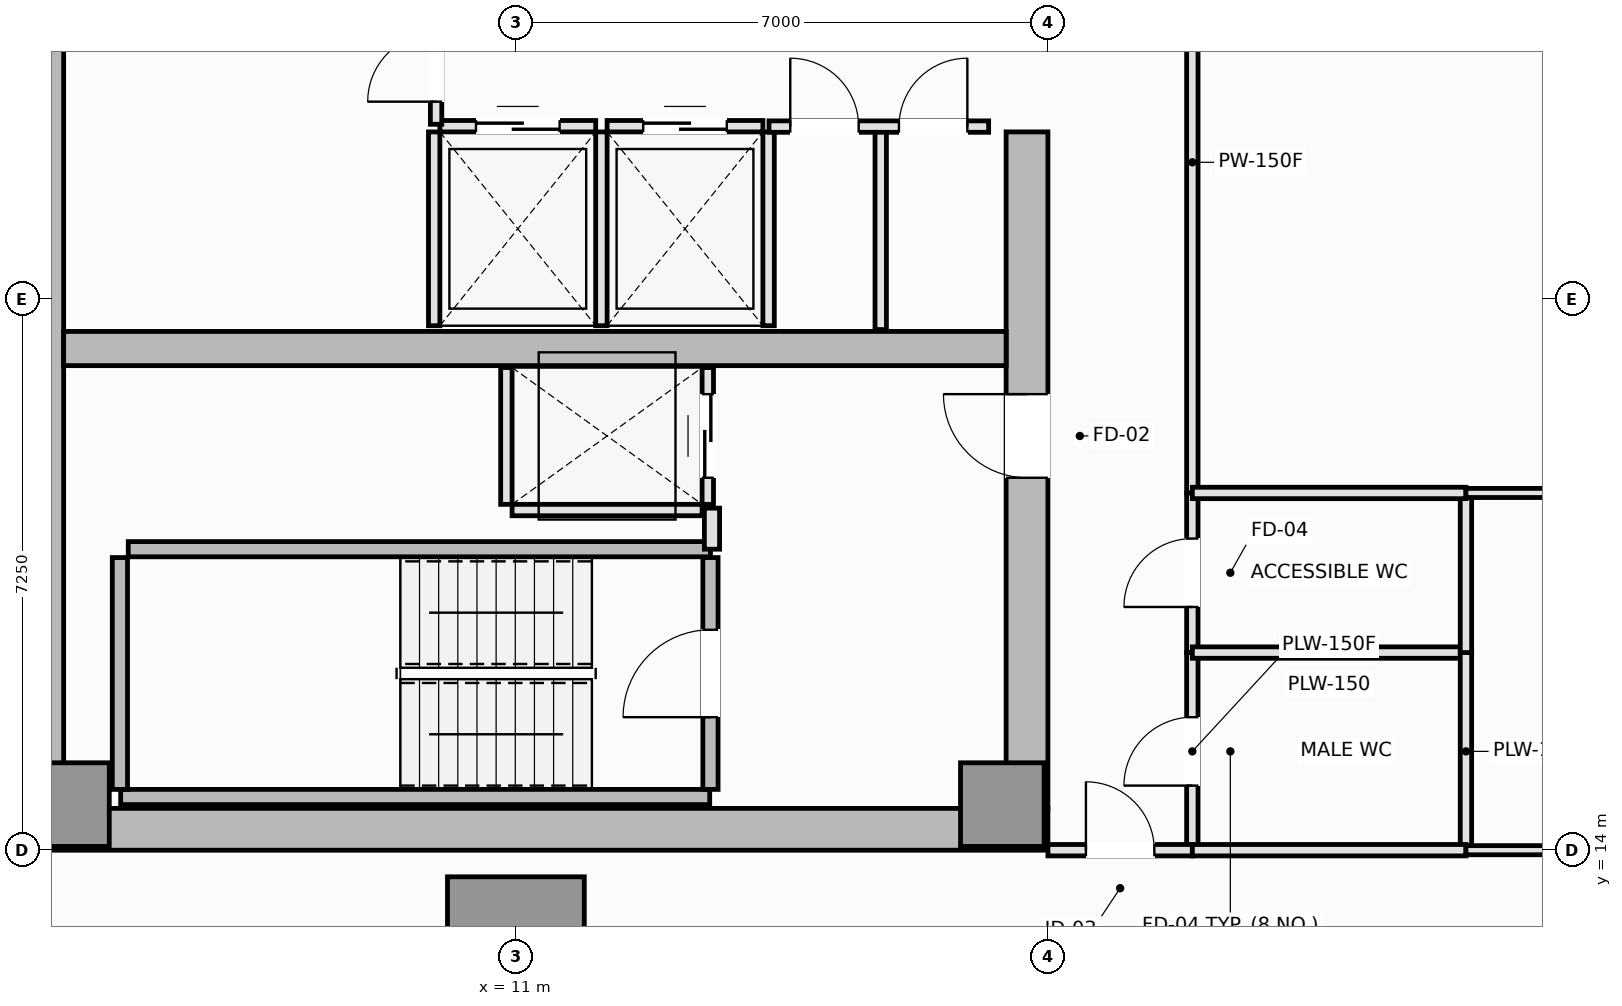
"""IFC4 building model, lengths in metres.
Left out: names, types, materials, properties, quantities, classifications, styles, units other than length and angle.
Written with IfcOpenShell. Run it as: python <this file> out.ifc"""

import sys

from ifc_helpers import new_model, si_unit, direction, frame, frame_2d, origin, origin_2d, place, context, subcontext, project, spatial, rectangle, extrude, element, fill, save


model = new_model("IFC4")
c1 = context("Model", 3, precision=1e-05, world=origin(), true_north=direction((0.0, 1.0)))
c2 = subcontext(c1, "Body", "Model", "MODEL_VIEW")
j1 = project(units=[si_unit("LENGTHUNIT", "METRE"), si_unit("PLANEANGLEUNIT", "RADIAN")], contexts=[c1])
p1 = place(None, origin())
s1 = spatial("IfcSite", under=j1, at=p1, CompositionType="ELEMENT")
p2 = place(p1, origin())
s2 = spatial("IfcBuilding", under=s1, at=p2, CompositionType="ELEMENT")
p3 = place(p2, frame((0.0, 0.0, 202.25)))
s3 = spatial("IfcBuildingStorey", under=s2, at=p3, CompositionType="ELEMENT", Elevation=202.25)
p4 = place(p3, frame((4.5, 14.275, 0.0), z_axis=(0.0, 0.0, 1.0), x_axis=(1.0, 0.0, 0.0)))
e1 = element("IfcWall", 1, at=p4, inside=s3, PredefinedType="SHEAR", context=c2, shape_type="SweptSolid", body=[
    extrude(rectangle(XDim=13.5, YDim=0.55, at=frame_2d((6.75, 0.0))), origin(), (0.0, 0.0, 1.0), 3.55),
])
p5 = place(p3, frame((4.775, 14.55, 0.0), z_axis=(0.0, 0.0, 1.0), x_axis=(0.0, 1.0, 0.0)))
e2 = element("IfcWall", 2, at=p5, inside=s3, PredefinedType="SHEAR", context=c2, shape_type="SweptSolid", body=[
    extrude(rectangle(XDim=21.4, YDim=0.55, at=frame_2d((10.7, 0.0))), origin(), (0.0, 0.0, 1.0), 3.55),
])
p6 = place(p3, frame((17.725, 14.55, 0.0), z_axis=(0.0, 0.0, 1.0), x_axis=(0.0, 1.0, 0.0)))
e3 = element("IfcWall", 3, at=p6, inside=s3, PredefinedType="SHEAR", context=c2, shape_type="SweptSolid", body=[
    extrude(rectangle(XDim=8.9, YDim=0.55, at=frame_2d((4.45, 0.0))), origin(), (0.0, 0.0, 1.0), 3.55),
])
p7 = place(p6, frame((4.35, 0.0, 0.0)))
e4 = element("IfcOpeningElement", 4, at=p7, cuts=e3, PredefinedType="OPENING", context=c2, shape_type="SweptSolid", body=[
    extrude(rectangle(XDim=1.1, YDim=2.15, at=frame_2d((0.55, 1.075))), frame((0.0, 0.285, 0.0), z_axis=(0.0, -1.0, 0.0), x_axis=(1.0, 0.0, 0.0)), (0.0, 0.0, 1.0), 0.57),
])
p8 = place(p3, frame((5.05, 20.6, 0.0), z_axis=(0.0, 0.0, 1.0), x_axis=(1.0, 0.0, 0.0)))
e5 = element("IfcWall", 5, at=p8, inside=s3, PredefinedType="SHEAR", context=c2, shape_type="SweptSolid", body=[
    extrude(rectangle(XDim=12.4, YDim=0.45, at=frame_2d((6.2, 0.0))), origin(), (0.0, 0.0, 1.0), 3.55),
])
for number, where, z_axis, x_axis in (
    (6, (5.1, 14.6, 0.0), (0.0, 0.0, 1.0), (1.0, 0.0, 0.0)),
    (7, (17.4, 14.6, 0.0), (0.0, 0.0, 1.0), (1.0, 0.0, 0.0)),
):
    element("IfcColumn", number, at=place(p3, frame(where, z_axis=z_axis, x_axis=x_axis)), inside=s3, PredefinedType="PILASTER", context=c2, shape_type="SweptSolid", body=[
        extrude(rectangle(XDim=1.1, YDim=1.1, at=origin_2d()), origin(), (0.0, 0.0, 1.0), 3.55),
    ])
p9 = place(p3, frame((11.0, 12.75, 0.0), z_axis=(0.0, 0.0, 1.0), x_axis=(1.0, 0.0, 0.0)))
e8 = element("IfcColumn", 8, at=p9, inside=s3, PredefinedType="COLUMN", context=c2, shape_type="SweptSolid", body=[
    extrude(rectangle(XDim=1.8, YDim=1.8, at=origin_2d()), origin(), (0.0, 0.0, 1.0), 3.55),
])
p10 = place(p3, frame((5.8, 14.7, 0.0), z_axis=(0.0, 0.0, 1.0), x_axis=(1.0, 0.0, 0.0)))
e9 = element("IfcWall", 9, at=p10, inside=s3, PredefinedType="SOLIDWALL", context=c2, shape_type="SweptSolid", body=[
    extrude(rectangle(XDim=7.75, YDim=0.2, at=frame_2d((3.875, 0.0))), origin(), (0.0, 0.0, 1.0), 3.55),
])
p11 = place(p3, frame((5.79, 14.8, 0.0), z_axis=(0.0, 0.0, 1.0), x_axis=(0.0, 1.0, 0.0)))
e10 = element("IfcWall", 10, at=p11, inside=s3, PredefinedType="SOLIDWALL", context=c2, shape_type="SweptSolid", body=[
    extrude(rectangle(XDim=3.05, YDim=0.2, at=frame_2d((1.525, 0.0))), origin(), (0.0, 0.0, 1.0), 3.55),
])
p12 = place(p3, frame((5.9, 17.96, 0.0), z_axis=(0.0, 0.0, 1.0), x_axis=(1.0, 0.0, 0.0)))
e11 = element("IfcWall", 11, at=p12, inside=s3, PredefinedType="SOLIDWALL", context=c2, shape_type="SweptSolid", body=[
    extrude(rectangle(XDim=7.66, YDim=0.2, at=frame_2d((3.83, 0.0))), origin(), (0.0, 0.0, 1.0), 3.55),
])
p13 = place(p3, frame((13.56, 14.8, 0.0), z_axis=(0.0, 0.0, 1.0), x_axis=(0.0, 1.0, 0.0)))
e12 = element("IfcWall", 12, at=p13, inside=s3, PredefinedType="SOLIDWALL", context=c2, shape_type="SweptSolid", body=[
    extrude(rectangle(XDim=3.05, YDim=0.2, at=frame_2d((1.525, 0.0))), origin(), (0.0, 0.0, 1.0), 3.55),
])
p14 = place(p13, frame((0.95, 0.0, 0.0)))
e13 = element("IfcOpeningElement", 13, at=p14, cuts=e12, PredefinedType="OPENING", context=c2, shape_type="SweptSolid", body=[
    extrude(rectangle(XDim=1.15, YDim=2.15, at=frame_2d((0.575, 1.075))), frame((0.0, 0.11, 0.0), z_axis=(0.0, -1.0, 0.0), x_axis=(1.0, 0.0, 0.0)), (0.0, 0.0, 1.0), 0.22),
])
p15 = place(p3, frame((10.0, 23.525, 0.0), z_axis=(0.0, 0.0, 1.0), x_axis=(1.0, 0.0, 0.0)))
e14 = element("IfcWall", 14, at=p15, inside=s3, PredefinedType="PARTITIONING", context=c2, shape_type="SweptSolid", body=[
    extrude(rectangle(XDim=2.05, YDim=0.15, at=frame_2d((1.025, 0.0))), origin(), (0.0, 0.0, 1.0), 3.37),
])
p16 = place(p15, frame((0.475, 0.0, 0.0)))
e15 = element("IfcOpeningElement", 15, at=p16, cuts=e14, PredefinedType="OPENING", context=c2, shape_type="SweptSolid", body=[
    extrude(rectangle(XDim=1.1, YDim=2.2, at=frame_2d((0.55, 1.1))), frame((0.0, 0.085, 0.0), z_axis=(0.0, -1.0, 0.0), x_axis=(1.0, 0.0, 0.0)), (0.0, 0.0, 1.0), 0.17),
])
for number, where, z_axis, x_axis in (
    (16, (9.925, 20.9, 0.0), (0.0, 0.0, 1.0), (0.0, 1.0, 0.0)),
    (17, (12.125, 20.9, 0.0), (0.0, 0.0, 1.0), (0.0, 1.0, 0.0)),
):
    element("IfcWall", number, at=place(p3, frame(where, z_axis=z_axis, x_axis=x_axis)), inside=s3, PredefinedType="PARTITIONING", context=c2, shape_type="SweptSolid", body=[
        extrude(rectangle(XDim=2.55, YDim=0.15, at=frame_2d((1.275, 0.0))), origin(), (0.0, 0.0, 1.0), 3.37),
    ])
p17 = place(p3, frame((12.2, 23.525, 0.0), z_axis=(0.0, 0.0, 1.0), x_axis=(1.0, 0.0, 0.0)))
e18 = element("IfcWall", 18, at=p17, inside=s3, PredefinedType="PARTITIONING", context=c2, shape_type="SweptSolid", body=[
    extrude(rectangle(XDim=2.05, YDim=0.15, at=frame_2d((1.025, 0.0))), origin(), (0.0, 0.0, 1.0), 3.37),
])
p18 = place(p17, frame((0.475, 0.0, 0.0)))
e19 = element("IfcOpeningElement", 19, at=p18, cuts=e18, PredefinedType="OPENING", context=c2, shape_type="SweptSolid", body=[
    extrude(rectangle(XDim=1.1, YDim=2.2, at=frame_2d((0.55, 1.1))), frame((0.0, 0.085, 0.0), z_axis=(0.0, -1.0, 0.0), x_axis=(1.0, 0.0, 0.0)), (0.0, 0.0, 1.0), 0.17),
])
p19 = place(p3, frame((14.325, 20.9, 0.0), z_axis=(0.0, 0.0, 1.0), x_axis=(0.0, 1.0, 0.0)))
e20 = element("IfcWall", 20, at=p19, inside=s3, PredefinedType="PARTITIONING", context=c2, shape_type="SweptSolid", body=[
    extrude(rectangle(XDim=2.55, YDim=0.15, at=frame_2d((1.275, 0.0))), origin(), (0.0, 0.0, 1.0), 3.37),
])
p20 = place(p3, frame((10.95, 18.475, 0.0), z_axis=(0.0, 0.0, 1.0), x_axis=(1.0, 0.0, 0.0)))
e21 = element("IfcWall", 21, at=p20, inside=s3, PredefinedType="PARTITIONING", context=c2, shape_type="SweptSolid", body=[
    extrude(rectangle(XDim=2.5, YDim=0.15, at=frame_2d((1.25, 0.0))), origin(), (0.0, 0.0, 1.0), 3.37),
])
p21 = place(p3, frame((10.875, 18.55, 0.0), z_axis=(0.0, 0.0, 1.0), x_axis=(0.0, 1.0, 0.0)))
e22 = element("IfcWall", 22, at=p21, inside=s3, PredefinedType="PARTITIONING", context=c2, shape_type="SweptSolid", body=[
    extrude(rectangle(XDim=1.8, YDim=0.15, at=frame_2d((0.9, 0.0))), origin(), (0.0, 0.0, 1.0), 3.37),
])
p22 = place(p3, frame((13.525, 18.55, 0.0), z_axis=(0.0, 0.0, 1.0), x_axis=(0.0, 1.0, 0.0)))
e23 = element("IfcWall", 23, at=p22, inside=s3, PredefinedType="PARTITIONING", context=c2, shape_type="SweptSolid", body=[
    extrude(rectangle(XDim=1.8, YDim=0.15, at=frame_2d((0.9, 0.0))), origin(), (0.0, 0.0, 1.0), 3.37),
])
p23 = place(p22, frame((0.35, 0.0, 0.0)))
e24 = element("IfcOpeningElement", 24, at=p23, cuts=e23, PredefinedType="OPENING", context=c2, shape_type="SweptSolid", body=[
    extrude(rectangle(XDim=1.1, YDim=2.2, at=frame_2d((0.55, 1.1))), frame((0.0, 0.085, 0.0), z_axis=(0.0, -1.0, 0.0), x_axis=(1.0, 0.0, 0.0)), (0.0, 0.0, 1.0), 0.17),
])
p24 = place(p3, frame((13.58, 17.96, 0.0), z_axis=(0.0, 0.0, 1.0), x_axis=(0.0, 1.0, 0.0)))
e25 = element("IfcWall", 25, at=p24, inside=s3, PredefinedType="PARTITIONING", context=c2, shape_type="SweptSolid", body=[
    extrude(rectangle(XDim=0.54, YDim=0.2, at=frame_2d((0.27, 0.0))), origin(), (0.0, 0.0, 1.0), 3.37),
])
p25 = place(p3, frame((9.95, 23.55, 0.0), z_axis=(0.0, 0.0, 1.0), x_axis=(0.0, 1.0, 0.0)))
e26 = element("IfcWall", 26, at=p25, inside=s3, PredefinedType="PARTITIONING", context=c2, shape_type="SweptSolid", body=[
    extrude(rectangle(XDim=3.4, YDim=0.15, at=frame_2d((1.7, 0.0))), origin(), (0.0, 0.0, 1.0), 3.37),
])
p26 = place(p25, frame((0.298, 0.0, 0.0)))
e27 = element("IfcOpeningElement", 27, at=p26, cuts=e26, PredefinedType="OPENING", context=c2, shape_type="SweptSolid", body=[
    extrude(rectangle(XDim=0.9, YDim=2.1, at=frame_2d((0.45, 1.05))), frame((0.0, 0.085, 0.0), z_axis=(0.0, -1.0, 0.0), x_axis=(1.0, 0.0, 0.0)), (0.0, 0.0, 1.0), 0.17),
])
p27 = place(p25, frame((2.202, 0.0, 0.0)))
e28 = element("IfcOpeningElement", 28, at=p27, cuts=e26, PredefinedType="OPENING", context=c2, shape_type="SweptSolid", body=[
    extrude(rectangle(XDim=0.9, YDim=2.1, at=frame_2d((0.45, 1.05))), frame((0.0, 0.085, 0.0), z_axis=(0.0, -1.0, 0.0), x_axis=(1.0, 0.0, 0.0)), (0.0, 0.0, 1.0), 0.17),
])
p28 = place(p3, frame((15.8, 20.85, 0.0), z_axis=(0.0, 0.0, 1.0), x_axis=(0.0, 1.0, 0.0)))
e29 = element("IfcWall", 29, at=p28, inside=s3, PredefinedType="PARTITIONING", context=c2, shape_type="SweptSolid", body=[
    extrude(rectangle(XDim=2.67, YDim=0.15, at=frame_2d((1.335, 0.0))), origin(), (0.0, 0.0, 1.0), 3.37),
])
p29 = place(p3, frame((14.33, 23.52, 0.0), z_axis=(0.0, 0.0, 1.0), x_axis=(1.0, 0.0, 0.0)))
e30 = element("IfcWall", 30, at=p29, inside=s3, PredefinedType="PARTITIONING", context=c2, shape_type="SweptSolid", body=[
    extrude(rectangle(XDim=2.89, YDim=0.15, at=frame_2d((1.445, 0.0))), origin(), (0.0, 0.0, 1.0), 3.37),
])
p30 = place(p29, frame((0.28, 0.0, 0.0)))
e31 = element("IfcOpeningElement", 31, at=p30, cuts=e30, PredefinedType="OPENING", context=c2, shape_type="SweptSolid", body=[
    extrude(rectangle(XDim=0.9, YDim=2.1, at=frame_2d((0.45, 1.05))), frame((0.0, 0.085, 0.0), z_axis=(0.0, -1.0, 0.0), x_axis=(1.0, 0.0, 0.0)), (0.0, 0.0, 1.0), 0.17),
])
p31 = place(p29, frame((1.71, 0.0, 0.0)))
e32 = element("IfcOpeningElement", 32, at=p31, cuts=e30, PredefinedType="OPENING", context=c2, shape_type="SweptSolid", body=[
    extrude(rectangle(XDim=0.9, YDim=2.1, at=frame_2d((0.45, 1.05))), frame((0.0, 0.085, 0.0), z_axis=(0.0, -1.0, 0.0), x_axis=(1.0, 0.0, 0.0)), (0.0, 0.0, 1.0), 0.17),
])
p32 = place(p3, frame((19.9, 14.0, 0.0), z_axis=(0.0, 0.0, 1.0), x_axis=(0.0, 1.0, 0.0)))
e33 = element("IfcWall", 33, at=p32, inside=s3, PredefinedType="PLUMBINGWALL", context=c2, shape_type="SweptSolid", body=[
    extrude(rectangle(XDim=2.6, YDim=0.15, at=frame_2d((1.3, 0.0))), origin(), (0.0, 0.0, 1.0), 3.37),
])
p33 = place(p32, frame((0.85, 0.0, 0.0)))
e34 = element("IfcOpeningElement", 34, at=p33, cuts=e33, PredefinedType="OPENING", context=c2, shape_type="SweptSolid", body=[
    extrude(rectangle(XDim=0.9, YDim=2.1, at=frame_2d((0.45, 1.05))), frame((0.0, 0.085, 0.0), z_axis=(0.0, -1.0, 0.0), x_axis=(1.0, 0.0, 0.0)), (0.0, 0.0, 1.0), 0.17),
])
p34 = place(p3, frame((19.9, 16.6, 0.0), z_axis=(0.0, 0.0, 1.0), x_axis=(0.0, 1.0, 0.0)))
e35 = element("IfcWall", 35, at=p34, inside=s3, PredefinedType="PLUMBINGWALL", context=c2, shape_type="SweptSolid", body=[
    extrude(rectangle(XDim=2.1, YDim=0.15, at=frame_2d((1.05, 0.0))), origin(), (0.0, 0.0, 1.0), 3.37),
])
p35 = place(p34, frame((0.6, 0.0, 0.0)))
e36 = element("IfcOpeningElement", 36, at=p35, cuts=e35, PredefinedType="OPENING", context=c2, shape_type="SweptSolid", body=[
    extrude(rectangle(XDim=0.9, YDim=2.1, at=frame_2d((0.45, 1.05))), frame((0.0, 0.085, 0.0), z_axis=(0.0, -1.0, 0.0), x_axis=(1.0, 0.0, 0.0)), (0.0, 0.0, 1.0), 0.17),
])
p36 = place(p3, frame((19.9, 18.7, 0.0), z_axis=(0.0, 0.0, 1.0), x_axis=(0.0, 1.0, 0.0)))
e37 = element("IfcWall", 37, at=p36, inside=s3, PredefinedType="PARTITIONING", context=c2, shape_type="SweptSolid", body=[
    extrude(rectangle(XDim=8.7, YDim=0.15, at=frame_2d((4.35, 0.0))), origin(), (0.0, 0.0, 1.0), 3.37),
])
p37 = place(p3, frame((18.0, 14.0, 0.0), z_axis=(0.0, 0.0, 1.0), x_axis=(1.0, 0.0, 0.0)))
e38 = element("IfcWall", 38, at=p37, inside=s3, PredefinedType="PARTITIONING", context=c2, shape_type="SweptSolid", body=[
    extrude(rectangle(XDim=1.9, YDim=0.15, at=frame_2d((0.95, 0.0))), origin(), (0.0, 0.0, 1.0), 3.37),
])
p38 = place(p37, frame((0.5, 0.0, 0.0)))
e39 = element("IfcOpeningElement", 39, at=p38, cuts=e38, PredefinedType="OPENING", context=c2, shape_type="SweptSolid", body=[
    extrude(rectangle(XDim=0.9, YDim=2.1, at=frame_2d((0.45, 1.05))), frame((0.0, 0.085, 0.0), z_axis=(0.0, -1.0, 0.0), x_axis=(1.0, 0.0, 0.0)), (0.0, 0.0, 1.0), 0.17),
])
p39 = place(p3, frame((19.9, 16.6, 0.0), z_axis=(0.0, 0.0, 1.0), x_axis=(1.0, 0.0, 0.0)))
e40 = element("IfcWall", 40, at=p39, inside=s3, PredefinedType="PLUMBINGWALL", context=c2, shape_type="SweptSolid", body=[
    extrude(rectangle(XDim=3.6, YDim=0.15, at=frame_2d((1.8, 0.0))), origin(), (0.0, 0.0, 1.0), 3.37),
])
p40 = place(p3, frame((23.5, 14.0, 0.0), z_axis=(0.0, 0.0, 1.0), x_axis=(0.0, 1.0, 0.0)))
e41 = element("IfcWall", 41, at=p40, inside=s3, PredefinedType="PLUMBINGWALL", context=c2, shape_type="SweptSolid", body=[
    extrude(rectangle(XDim=2.6, YDim=0.15, at=frame_2d((1.3, 0.0))), origin(), (0.0, 0.0, 1.0), 3.37),
])
p41 = place(p3, frame((19.9, 14.0, 0.0), z_axis=(0.0, 0.0, 1.0), x_axis=(1.0, 0.0, 0.0)))
e42 = element("IfcWall", 42, at=p41, inside=s3, PredefinedType="PLUMBINGWALL", context=c2, shape_type="SweptSolid", body=[
    extrude(rectangle(XDim=3.6, YDim=0.15, at=frame_2d((1.8, 0.0))), origin(), (0.0, 0.0, 1.0), 3.37),
])
p42 = place(p3, frame((23.5, 16.6, 0.0), z_axis=(0.0, 0.0, 1.0), x_axis=(0.0, 1.0, 0.0)))
e43 = element("IfcWall", 43, at=p42, inside=s3, PredefinedType="PLUMBINGWALL", context=c2, shape_type="SweptSolid", body=[
    extrude(rectangle(XDim=2.1, YDim=0.15, at=frame_2d((1.05, 0.0))), origin(), (0.0, 0.0, 1.0), 3.37),
])
p43 = place(p3, frame((19.9, 18.7, 0.0), z_axis=(0.0, 0.0, 1.0), x_axis=(1.0, 0.0, 0.0)))
e44 = element("IfcWall", 44, at=p43, inside=s3, PredefinedType="PLUMBINGWALL", context=c2, shape_type="SweptSolid", body=[
    extrude(rectangle(XDim=3.6, YDim=0.15, at=frame_2d((1.8, 0.0))), origin(), (0.0, 0.0, 1.0), 3.37),
])
for number, where, z_axis, x_axis in (
    (45, (23.5, 18.7, 0.0), (0.0, 0.0, 1.0), (1.0, 0.0, 0.0)),
    (46, (23.5, 14.0, 0.0), (0.0, 0.0, 1.0), (1.0, 0.0, 0.0)),
):
    element("IfcWall", number, at=place(p3, frame(where, z_axis=z_axis, x_axis=x_axis)), inside=s3, PredefinedType="PARTITIONING", context=c2, shape_type="SweptSolid", body=[
        extrude(rectangle(XDim=12.8, YDim=0.12, at=frame_2d((6.4, 0.0))), origin(), (0.0, 0.0, 1.0), 3.37),
    ])
p44 = place(p14, origin())
e47 = element("IfcDoor", 47, at=p44, inside=s3, OperationType="SINGLE_SWING_LEFT", PredefinedType="DOOR", context=c2, shape_type="SweptSolid", body=[
    extrude(rectangle(XDim=1.15, YDim=2.15, at=frame_2d((0.575, 1.075))), frame((0.0, 0.025, 0.0), z_axis=(0.0, -1.0, 0.0), x_axis=(1.0, 0.0, 0.0)), (0.0, 0.0, 1.0), 0.05),
])
fill(e13, e47)
p45 = place(p16, origin())
e48 = element("IfcDoor", 48, at=p45, inside=s3, OperationType="DOUBLE_DOOR_SLIDING", PredefinedType="DOOR", context=c2, shape_type="SweptSolid", body=[
    extrude(rectangle(XDim=1.1, YDim=2.2, at=frame_2d((0.55, 1.1))), frame((0.0, 0.025, 0.0), z_axis=(0.0, -1.0, 0.0), x_axis=(1.0, 0.0, 0.0)), (0.0, 0.0, 1.0), 0.05),
])
fill(e15, e48)
p46 = place(p18, origin())
e49 = element("IfcDoor", 49, at=p46, inside=s3, OperationType="DOUBLE_DOOR_SLIDING", PredefinedType="DOOR", context=c2, shape_type="SweptSolid", body=[
    extrude(rectangle(XDim=1.1, YDim=2.2, at=frame_2d((0.55, 1.1))), frame((0.0, 0.025, 0.0), z_axis=(0.0, -1.0, 0.0), x_axis=(1.0, 0.0, 0.0)), (0.0, 0.0, 1.0), 0.05),
])
fill(e19, e49)
p47 = place(p23, origin())
e50 = element("IfcDoor", 50, at=p47, inside=s3, OperationType="DOUBLE_DOOR_SLIDING", PredefinedType="DOOR", context=c2, shape_type="SweptSolid", body=[
    extrude(rectangle(XDim=1.1, YDim=2.2, at=frame_2d((0.55, 1.1))), frame((0.0, 0.025, 0.0), z_axis=(0.0, -1.0, 0.0), x_axis=(1.0, 0.0, 0.0)), (0.0, 0.0, 1.0), 0.05),
])
fill(e24, e50)
p48 = place(p7, origin())
e51 = element("IfcDoor", 51, at=p48, inside=s3, OperationType="SINGLE_SWING_RIGHT", PredefinedType="DOOR", context=c2, shape_type="SweptSolid", body=[
    extrude(rectangle(XDim=1.1, YDim=2.15, at=frame_2d((0.55, 1.075))), frame((0.0, 0.025, 0.0), z_axis=(0.0, -1.0, 0.0), x_axis=(1.0, 0.0, 0.0)), (0.0, 0.0, 1.0), 0.05),
])
fill(e4, e51)
p49 = place(p26, origin())
e52 = element("IfcDoor", 52, at=p49, inside=s3, OperationType="SINGLE_SWING_LEFT", PredefinedType="DOOR", context=c2, shape_type="SweptSolid", body=[
    extrude(rectangle(XDim=0.9, YDim=2.1, at=frame_2d((0.45, 1.05))), frame((0.0, 0.025, 0.0), z_axis=(0.0, -1.0, 0.0), x_axis=(1.0, 0.0, 0.0)), (0.0, 0.0, 1.0), 0.05),
])
fill(e27, e52)
p50 = place(p30, origin())
e53 = element("IfcDoor", 53, at=p50, inside=s3, OperationType="SINGLE_SWING_LEFT", PredefinedType="DOOR", context=c2, shape_type="SweptSolid", body=[
    extrude(rectangle(XDim=0.9, YDim=2.1, at=frame_2d((0.45, 1.05))), frame((0.0, 0.025, 0.0), z_axis=(0.0, -1.0, 0.0), x_axis=(1.0, 0.0, 0.0)), (0.0, 0.0, 1.0), 0.05),
])
fill(e31, e53)
p51 = place(p31, origin())
e54 = element("IfcDoor", 54, at=p51, inside=s3, OperationType="SINGLE_SWING_RIGHT", PredefinedType="DOOR", context=c2, shape_type="SweptSolid", body=[
    extrude(rectangle(XDim=0.9, YDim=2.1, at=frame_2d((0.45, 1.05))), frame((0.0, 0.025, 0.0), z_axis=(0.0, -1.0, 0.0), x_axis=(1.0, 0.0, 0.0)), (0.0, 0.0, 1.0), 0.05),
])
fill(e32, e54)
p52 = place(p33, origin())
e55 = element("IfcDoor", 55, at=p52, inside=s3, OperationType="SINGLE_SWING_LEFT", PredefinedType="DOOR", context=c2, shape_type="SweptSolid", body=[
    extrude(rectangle(XDim=0.9, YDim=2.1, at=frame_2d((0.45, 1.05))), frame((0.0, 0.025, 0.0), z_axis=(0.0, -1.0, 0.0), x_axis=(1.0, 0.0, 0.0)), (0.0, 0.0, 1.0), 0.05),
])
fill(e34, e55)
p53 = place(p35, origin())
e56 = element("IfcDoor", 56, at=p53, inside=s3, OperationType="SINGLE_SWING_LEFT", PredefinedType="DOOR", context=c2, shape_type="SweptSolid", body=[
    extrude(rectangle(XDim=0.9, YDim=2.1, at=frame_2d((0.45, 1.05))), frame((0.0, 0.025, 0.0), z_axis=(0.0, -1.0, 0.0), x_axis=(1.0, 0.0, 0.0)), (0.0, 0.0, 1.0), 0.05),
])
fill(e36, e56)
p54 = place(p38, origin())
e57 = element("IfcDoor", 57, at=p54, inside=s3, OperationType="SINGLE_SWING_LEFT", PredefinedType="DOOR", context=c2, shape_type="SweptSolid", body=[
    extrude(rectangle(XDim=0.9, YDim=2.1, at=frame_2d((0.45, 1.05))), frame((0.0, 0.025, 0.0), z_axis=(0.0, -1.0, 0.0), x_axis=(1.0, 0.0, 0.0)), (0.0, 0.0, 1.0), 0.05),
])
fill(e39, e57)
save(model, sys.argv[1])
